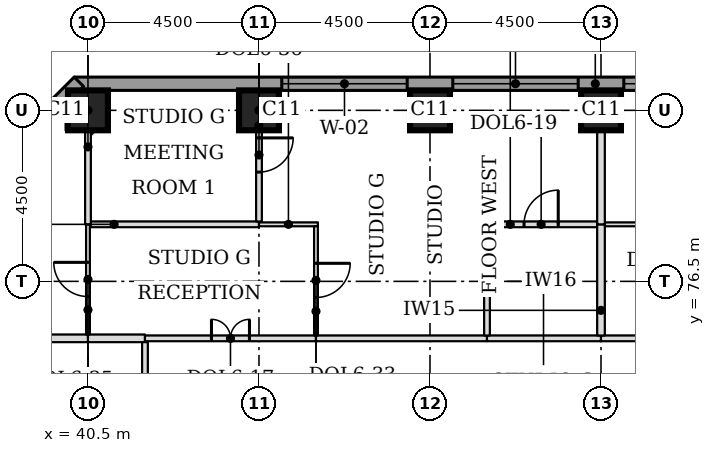
"""IFC4 building model, lengths in metres.
Left out: names, types, materials, properties, quantities, classifications, styles, units other than length and angle.
Written with IfcOpenShell. Run it as: python <this file> out.ifc"""

import sys

from ifc_helpers import new_model, si_unit, direction, frame, frame_2d, origin, origin_2d, place, context, subcontext, project, spatial, rectangle, extrude, element, fill, save


model = new_model("IFC4")
c1 = context("Model", 3, precision=1e-05, world=origin(), true_north=direction((0.0, 1.0)))
c2 = subcontext(c1, "Body", "Model", "MODEL_VIEW")
j1 = project(units=[si_unit("LENGTHUNIT", "METRE"), si_unit("PLANEANGLEUNIT", "RADIAN")], contexts=[c1])
p1 = place(None, origin())
s1 = spatial("IfcSite", under=j1, at=p1, CompositionType="ELEMENT")
p2 = place(p1, origin())
s2 = spatial("IfcBuilding", under=s1, at=p2, CompositionType="ELEMENT")
p3 = place(p2, frame((0.0, 0.0, 119.6)))
s3 = spatial("IfcBuildingStorey", under=s2, at=p3, CompositionType="ELEMENT", Elevation=119.6)
for number, where, z_axis, x_axis in (
    (1, (40.5, 81.0, 0.0), (0.0, 0.0, 1.0), (1.0, 0.0, 0.0)),
    (2, (45.0, 81.0, 0.0), (0.0, 0.0, 1.0), (1.0, 0.0, 0.0)),
    (3, (49.5, 81.0, 0.0), (0.0, 0.0, 1.0), (1.0, 0.0, 0.0)),
    (4, (54.0, 81.0, 0.0), (0.0, 0.0, 1.0), (1.0, 0.0, 0.0)),
):
    element("IfcColumn", number, at=place(p3, frame(where, z_axis=z_axis, x_axis=x_axis)), inside=s3, PredefinedType="COLUMN", context=c2, shape_type="SweptSolid", body=[
        extrude(rectangle(XDim=1.05, YDim=1.05, at=origin_2d()), origin(), (0.0, 0.0, 1.0), 3.7),
    ])
p4 = place(p3, frame((72.362, 81.7, 0.0), z_axis=(0.0, 0.0, 1.0), x_axis=(-1.0, 0.0, 0.0)))
e5 = element("IfcWall", 5, at=p4, inside=s3, PredefinedType="STANDARD", context=c2, shape_type="SweptSolid", body=[
    extrude(rectangle(XDim=32.225, YDim=0.35, at=frame_2d((16.112, 0.0))), origin(), (0.0, 0.0, 1.0), 3.525),
])
p5 = place(p4, frame((5.462, 0.0, 0.9)))
e6 = element("IfcOpeningElement", 6, at=p5, cuts=e5, PredefinedType="OPENING", context=c2, shape_type="SweptSolid", body=[
    extrude(rectangle(XDim=3.3, YDim=1.9, at=frame_2d((1.65, 0.95))), frame((0.0, 0.185, 0.0), z_axis=(0.0, -1.0, 0.0), x_axis=(1.0, 0.0, 0.0)), (0.0, 0.0, 1.0), 0.37),
])
p6 = place(p4, frame((9.962, 0.0, 0.9)))
e7 = element("IfcOpeningElement", 7, at=p6, cuts=e5, PredefinedType="OPENING", context=c2, shape_type="SweptSolid", body=[
    extrude(rectangle(XDim=3.3, YDim=1.9, at=frame_2d((1.65, 0.95))), frame((0.0, 0.185, 0.0), z_axis=(0.0, -1.0, 0.0), x_axis=(1.0, 0.0, 0.0)), (0.0, 0.0, 1.0), 0.37),
])
p7 = place(p4, frame((14.462, 0.0, 0.9)))
e8 = element("IfcOpeningElement", 8, at=p7, cuts=e5, PredefinedType="OPENING", context=c2, shape_type="SweptSolid", body=[
    extrude(rectangle(XDim=3.3, YDim=1.9, at=frame_2d((1.65, 0.95))), frame((0.0, 0.185, 0.0), z_axis=(0.0, -1.0, 0.0), x_axis=(1.0, 0.0, 0.0)), (0.0, 0.0, 1.0), 0.37),
])
p8 = place(p4, frame((18.962, 0.0, 0.9)))
e9 = element("IfcOpeningElement", 9, at=p8, cuts=e5, PredefinedType="OPENING", context=c2, shape_type="SweptSolid", body=[
    extrude(rectangle(XDim=3.3, YDim=1.9, at=frame_2d((1.65, 0.95))), frame((0.0, 0.185, 0.0), z_axis=(0.0, -1.0, 0.0), x_axis=(1.0, 0.0, 0.0)), (0.0, 0.0, 1.0), 0.37),
])
p9 = place(p4, frame((23.462, 0.0, 0.9)))
e10 = element("IfcOpeningElement", 10, at=p9, cuts=e5, PredefinedType="OPENING", context=c2, shape_type="SweptSolid", body=[
    extrude(rectangle(XDim=3.3, YDim=1.9, at=frame_2d((1.65, 0.95))), frame((0.0, 0.185, 0.0), z_axis=(0.0, -1.0, 0.0), x_axis=(1.0, 0.0, 0.0)), (0.0, 0.0, 1.0), 0.37),
])
p10 = place(p3, frame((40.261, 81.751, 0.0), z_axis=(0.0, 0.0, 1.0), x_axis=(-0.707106781187, -0.707106781187, 0.0)))
e11 = element("IfcWall", 11, at=p10, inside=s3, PredefinedType="STANDARD", context=c2, shape_type="SweptSolid", body=[
    extrude(rectangle(XDim=7.089, YDim=0.35, at=frame_2d((3.544, 0.0))), origin(), (0.0, 0.0, 1.0), 3.525),
])
p11 = place(p10, frame((1.894, 0.0, 0.9)))
e12 = element("IfcOpeningElement", 12, at=p11, cuts=e11, PredefinedType="OPENING", context=c2, shape_type="SweptSolid", body=[
    extrude(rectangle(XDim=3.3, YDim=1.9, at=frame_2d((1.65, 0.95))), frame((0.0, 0.185, 0.0), z_axis=(0.0, -1.0, 0.0), x_axis=(1.0, 0.0, 0.0)), (0.0, 0.0, 1.0), 0.37),
])
p12 = place(p3, frame((35.475, 75.0, 0.0), z_axis=(0.0, 0.0, 1.0), x_axis=(1.0, 0.0, 0.0)))
e13 = element("IfcWall", 13, at=p12, inside=s3, PredefinedType="PARTITIONING", context=c2, shape_type="SweptSolid", body=[
    extrude(rectangle(XDim=5.025, YDim=0.2, at=frame_2d((2.512, 0.0))), origin(), (0.0, 0.0, 1.0), 3.55),
])
p13 = place(p3, frame((40.5, 75.0, 0.0), z_axis=(0.0, 0.0, 1.0), x_axis=(1.0, 0.0, 0.0)))
e14 = element("IfcWall", 14, at=p13, inside=s3, PredefinedType="PARTITIONING", context=c2, shape_type="SweptSolid", body=[
    extrude(rectangle(XDim=1.5, YDim=0.2, at=frame_2d((0.75, 0.0))), origin(), (0.0, 0.0, 1.0), 3.55),
])
p14 = place(p3, frame((42.0, 75.0, 0.0), z_axis=(0.0, 0.0, 1.0), x_axis=(1.0, 0.0, 0.0)))
e15 = element("IfcWall", 15, at=p14, inside=s3, PredefinedType="PARTITIONING", context=c2, shape_type="SweptSolid", body=[
    extrude(rectangle(XDim=4.5, YDim=0.15, at=frame_2d((2.25, 0.0))), origin(), (0.0, 0.0, 1.0), 3.55),
])
p15 = place(p14, frame((1.75, 0.0, 0.0)))
e16 = element("IfcOpeningElement", 16, at=p15, cuts=e15, PredefinedType="OPENING", context=c2, shape_type="SweptSolid", body=[
    extrude(rectangle(XDim=1.0, YDim=2.1, at=frame_2d((0.5, 1.05))), frame((0.0, 0.085, 0.0), z_axis=(0.0, -1.0, 0.0), x_axis=(1.0, 0.0, 0.0)), (0.0, 0.0, 1.0), 0.17),
])
p16 = place(p3, frame((46.5, 75.0, 0.0), z_axis=(0.0, 0.0, 1.0), x_axis=(1.0, 0.0, 0.0)))
e17 = element("IfcWall", 17, at=p16, inside=s3, PredefinedType="PARTITIONING", context=c2, shape_type="SweptSolid", body=[
    extrude(rectangle(XDim=4.5, YDim=0.15, at=frame_2d((2.25, 0.0))), origin(), (0.0, 0.0, 1.0), 3.55),
])
p17 = place(p3, frame((51.0, 75.0, 0.0), z_axis=(0.0, 0.0, 1.0), x_axis=(1.0, 0.0, 0.0)))
e18 = element("IfcWall", 18, at=p17, inside=s3, PredefinedType="PARTITIONING", context=c2, shape_type="SweptSolid", body=[
    extrude(rectangle(XDim=3.0, YDim=0.15, at=frame_2d((1.5, 0.0))), origin(), (0.0, 0.0, 1.0), 3.55),
])
p18 = place(p3, frame((54.0, 75.0, 0.0), z_axis=(0.0, 0.0, 1.0), x_axis=(1.0, 0.0, 0.0)))
e19 = element("IfcWall", 19, at=p18, inside=s3, PredefinedType="PARTITIONING", context=c2, shape_type="SweptSolid", body=[
    extrude(rectangle(XDim=4.5, YDim=0.15, at=frame_2d((2.25, 0.0))), origin(), (0.0, 0.0, 1.0), 3.55),
])
p19 = place(p18, frame((1.75, 0.0, 0.0)))
e20 = element("IfcOpeningElement", 20, at=p19, cuts=e19, PredefinedType="OPENING", context=c2, shape_type="SweptSolid", body=[
    extrude(rectangle(XDim=1.0, YDim=2.1, at=frame_2d((0.5, 1.05))), frame((0.0, 0.085, 0.0), z_axis=(0.0, -1.0, 0.0), x_axis=(1.0, 0.0, 0.0)), (0.0, 0.0, 1.0), 0.17),
])
p20 = place(p3, frame((40.575, 78.0, 0.0), z_axis=(0.0, 0.0, 1.0), x_axis=(1.0, 0.0, 0.0)))
e21 = element("IfcWall", 21, at=p20, inside=s3, PredefinedType="PARTITIONING", context=c2, shape_type="SweptSolid", body=[
    extrude(rectangle(XDim=4.425, YDim=0.15, at=frame_2d((2.212, 0.0))), origin(), (0.0, 0.0, 1.0), 3.55),
])
p21 = place(p3, frame((45.0, 78.0, 0.0), z_axis=(0.0, 0.0, 1.0), x_axis=(1.0, 0.0, 0.0)))
e22 = element("IfcWall", 22, at=p21, inside=s3, PredefinedType="PARTITIONING", context=c2, shape_type="SweptSolid", body=[
    extrude(rectangle(XDim=1.55, YDim=0.1, at=frame_2d((0.775, 0.0))), origin(), (0.0, 0.0, 1.0), 3.55),
])
p22 = place(p3, frame((50.925, 78.0, 0.0), z_axis=(0.0, 0.0, 1.0), x_axis=(1.0, 0.0, 0.0)))
e23 = element("IfcWall", 23, at=p22, inside=s3, PredefinedType="PARTITIONING", context=c2, shape_type="SweptSolid", body=[
    extrude(rectangle(XDim=2.975, YDim=0.15, at=frame_2d((1.487, 0.0))), origin(), (0.0, 0.0, 1.0), 3.55),
])
p23 = place(p22, frame((1.05, 0.0, 0.0)))
e24 = element("IfcOpeningElement", 24, at=p23, cuts=e23, PredefinedType="OPENING", context=c2, shape_type="SweptSolid", body=[
    extrude(rectangle(XDim=0.9, YDim=2.1, at=frame_2d((0.45, 1.05))), frame((0.0, 0.085, 0.0), z_axis=(0.0, -1.0, 0.0), x_axis=(1.0, 0.0, 0.0)), (0.0, 0.0, 1.0), 0.17),
])
p24 = place(p3, frame((54.1, 78.0, 0.0), z_axis=(0.0, 0.0, 1.0), x_axis=(1.0, 0.0, 0.0)))
e25 = element("IfcWall", 25, at=p24, inside=s3, PredefinedType="PARTITIONING", context=c2, shape_type="SweptSolid", body=[
    extrude(rectangle(XDim=4.35, YDim=0.1, at=frame_2d((2.175, 0.0))), origin(), (0.0, 0.0, 1.0), 3.55),
])
p25 = place(p24, frame((1.75, 0.0, 0.0)))
e26 = element("IfcOpeningElement", 26, at=p25, cuts=e25, PredefinedType="OPENING", context=c2, shape_type="SweptSolid", body=[
    extrude(rectangle(XDim=0.9, YDim=2.1, at=frame_2d((0.45, 1.05))), frame((0.0, 0.06, 0.0), z_axis=(0.0, -1.0, 0.0), x_axis=(1.0, 0.0, 0.0)), (0.0, 0.0, 1.0), 0.12),
])
p26 = place(p3, frame((42.0, 57.075, 0.0), z_axis=(0.0, 0.0, 1.0), x_axis=(0.0, 1.0, 0.0)))
e27 = element("IfcWall", 27, at=p26, inside=s3, PredefinedType="PARTITIONING", context=c2, shape_type="SweptSolid", body=[
    extrude(rectangle(XDim=17.825, YDim=0.15, at=frame_2d((8.913, 0.0))), origin(), (0.0, 0.0, 1.0), 3.55),
])
p27 = place(p3, frame((46.5, 75.075, 0.0), z_axis=(0.0, 0.0, 1.0), x_axis=(0.0, 1.0, 0.0)))
e28 = element("IfcWall", 28, at=p27, inside=s3, PredefinedType="PARTITIONING", context=c2, shape_type="SweptSolid", body=[
    extrude(rectangle(XDim=2.875, YDim=0.1, at=frame_2d((1.438, 0.0))), origin(), (0.0, 0.0, 1.0), 3.022),
])
p28 = place(p27, frame((1.0, 0.0, 0.0)))
e29 = element("IfcOpeningElement", 29, at=p28, cuts=e28, PredefinedType="OPENING", context=c2, shape_type="SweptSolid", body=[
    extrude(rectangle(XDim=0.9, YDim=2.1, at=frame_2d((0.45, 1.05))), frame((0.0, 0.06, 0.0), z_axis=(0.0, -1.0, 0.0), x_axis=(1.0, 0.0, 0.0)), (0.0, 0.0, 1.0), 0.12),
])
p29 = place(p3, frame((51.0, 75.075, 0.0), z_axis=(0.0, 0.0, 1.0), x_axis=(0.0, 1.0, 0.0)))
e30 = element("IfcWall", 30, at=p29, inside=s3, PredefinedType="PARTITIONING", context=c2, shape_type="SweptSolid", body=[
    extrude(rectangle(XDim=2.85, YDim=0.15, at=frame_2d((1.425, 0.0))), origin(), (0.0, 0.0, 1.0), 3.55),
])
p30 = place(p3, frame((54.0, 75.075, 0.0), z_axis=(0.0, 0.0, 1.0), x_axis=(0.0, 1.0, 0.0)))
e31 = element("IfcWall", 31, at=p30, inside=s3, PredefinedType="PARTITIONING", context=c2, shape_type="SweptSolid", body=[
    extrude(rectangle(XDim=2.925, YDim=0.2, at=frame_2d((1.462, 0.0))), origin(), (0.0, 0.0, 1.0), 3.55),
])
p31 = place(p3, frame((40.5, 75.1, 0.0), z_axis=(0.0, 0.0, 1.0), x_axis=(0.0, 1.0, 0.0)))
e32 = element("IfcWall", 32, at=p31, inside=s3, PredefinedType="PARTITIONING", context=c2, shape_type="SweptSolid", body=[
    extrude(rectangle(XDim=2.9, YDim=0.1, at=frame_2d((1.45, 0.0))), origin(), (0.0, 0.0, 1.0), 3.55),
])
p32 = place(p31, frame((1.0, 0.0, 0.0)))
e33 = element("IfcOpeningElement", 33, at=p32, cuts=e32, PredefinedType="OPENING", context=c2, shape_type="SweptSolid", body=[
    extrude(rectangle(XDim=0.9, YDim=2.1, at=frame_2d((0.45, 1.05))), frame((0.0, 0.06, 0.0), z_axis=(0.0, -1.0, 0.0), x_axis=(1.0, 0.0, 0.0)), (0.0, 0.0, 1.0), 0.12),
])
p33 = place(p3, frame((40.5, 78.0, 0.0), z_axis=(0.0, 0.0, 1.0), x_axis=(0.0, 1.0, 0.0)))
e34 = element("IfcWall", 34, at=p33, inside=s3, PredefinedType="PARTITIONING", context=c2, shape_type="SweptSolid", body=[
    extrude(rectangle(XDim=2.475, YDim=0.15, at=frame_2d((1.238, 0.0))), origin(), (0.0, 0.0, 1.0), 3.55),
])
p34 = place(p3, frame((54.0, 78.0, 0.0), z_axis=(0.0, 0.0, 1.0), x_axis=(0.0, 1.0, 0.0)))
e35 = element("IfcWall", 35, at=p34, inside=s3, PredefinedType="PARTITIONING", context=c2, shape_type="SweptSolid", body=[
    extrude(rectangle(XDim=3.525, YDim=0.2, at=frame_2d((1.762, 0.0))), origin(), (0.0, 0.0, 1.0), 3.55),
])
p35 = place(p3, frame((45.0, 78.075, 0.0), z_axis=(0.0, 0.0, 1.0), x_axis=(0.0, 1.0, 0.0)))
e36 = element("IfcWall", 36, at=p35, inside=s3, PredefinedType="PARTITIONING", context=c2, shape_type="SweptSolid", body=[
    extrude(rectangle(XDim=3.45, YDim=0.15, at=frame_2d((1.725, 0.0))), origin(), (0.0, 0.0, 1.0), 3.55),
])
p36 = place(p35, frame((1.3, 0.0, 0.0)))
e37 = element("IfcOpeningElement", 37, at=p36, cuts=e36, PredefinedType="OPENING", context=c2, shape_type="SweptSolid", body=[
    extrude(rectangle(XDim=0.9, YDim=2.1, at=frame_2d((0.45, 1.05))), frame((0.0, 0.085, 0.0), z_axis=(0.0, -1.0, 0.0), x_axis=(1.0, 0.0, 0.0)), (0.0, 0.0, 1.0), 0.17),
])
p37 = place(p7, origin())
e38 = element("IfcWindow", 38, at=p37, inside=s3, PartitioningType="SINGLE_PANEL", PredefinedType="WINDOW", context=c2, shape_type="SweptSolid", body=[
    extrude(rectangle(XDim=3.3, YDim=1.9, at=frame_2d((1.65, 0.95))), frame((0.0, 0.085, 0.0), z_axis=(0.0, -1.0, 0.0), x_axis=(1.0, 0.0, 0.0)), (0.0, 0.0, 1.0), 0.06),
])
fill(e8, e38)
p38 = place(p8, origin())
e39 = element("IfcWindow", 39, at=p38, inside=s3, PartitioningType="SINGLE_PANEL", PredefinedType="WINDOW", context=c2, shape_type="SweptSolid", body=[
    extrude(rectangle(XDim=3.3, YDim=1.9, at=frame_2d((1.65, 0.95))), frame((0.0, 0.085, 0.0), z_axis=(0.0, -1.0, 0.0), x_axis=(1.0, 0.0, 0.0)), (0.0, 0.0, 1.0), 0.06),
])
fill(e9, e39)
p39 = place(p9, origin())
e40 = element("IfcWindow", 40, at=p39, inside=s3, PartitioningType="SINGLE_PANEL", PredefinedType="WINDOW", context=c2, shape_type="SweptSolid", body=[
    extrude(rectangle(XDim=3.3, YDim=1.9, at=frame_2d((1.65, 0.95))), frame((0.0, 0.085, 0.0), z_axis=(0.0, -1.0, 0.0), x_axis=(1.0, 0.0, 0.0)), (0.0, 0.0, 1.0), 0.06),
])
fill(e10, e40)
p40 = place(p15, origin())
e41 = element("IfcDoor", 41, at=p40, inside=s3, OperationType="DOUBLE_DOOR_SINGLE_SWING", PredefinedType="DOOR", context=c2, shape_type="SweptSolid", body=[
    extrude(rectangle(XDim=1.0, YDim=2.1, at=frame_2d((0.5, 1.05))), frame((0.0, 0.025, 0.0), z_axis=(0.0, -1.0, 0.0), x_axis=(1.0, 0.0, 0.0)), (0.0, 0.0, 1.0), 0.05),
])
fill(e16, e41)
p41 = place(p28, frame((0.9, 0.0, 0.0), z_axis=(0.0, 0.0, 1.0), x_axis=(-1.0, 0.0, 0.0)))
e42 = element("IfcDoor", 42, at=p41, inside=s3, OperationType="SINGLE_SWING_LEFT", PredefinedType="DOOR", context=c2, shape_type="SweptSolid", body=[
    extrude(rectangle(XDim=0.9, YDim=2.1, at=frame_2d((0.45, 1.05))), frame((0.0, 0.025, 0.0), z_axis=(0.0, -1.0, 0.0), x_axis=(1.0, 0.0, 0.0)), (0.0, 0.0, 1.0), 0.05),
])
fill(e29, e42)
p42 = place(p32, origin())
e43 = element("IfcDoor", 43, at=p42, inside=s3, OperationType="SINGLE_SWING_RIGHT", PredefinedType="DOOR", context=c2, shape_type="SweptSolid", body=[
    extrude(rectangle(XDim=0.9, YDim=2.1, at=frame_2d((0.45, 1.05))), frame((0.0, 0.025, 0.0), z_axis=(0.0, -1.0, 0.0), x_axis=(1.0, 0.0, 0.0)), (0.0, 0.0, 1.0), 0.05),
])
fill(e33, e43)
p43 = place(p23, origin())
e44 = element("IfcDoor", 44, at=p43, inside=s3, OperationType="SINGLE_SWING_RIGHT", PredefinedType="DOOR", context=c2, shape_type="SweptSolid", body=[
    extrude(rectangle(XDim=0.9, YDim=2.1, at=frame_2d((0.45, 1.05))), frame((0.0, 0.025, 0.0), z_axis=(0.0, -1.0, 0.0), x_axis=(1.0, 0.0, 0.0)), (0.0, 0.0, 1.0), 0.05),
])
fill(e24, e44)
p44 = place(p36, frame((0.9, 0.0, 0.0), z_axis=(0.0, 0.0, 1.0), x_axis=(-1.0, 0.0, 0.0)))
e45 = element("IfcDoor", 45, at=p44, inside=s3, OperationType="SINGLE_SWING_LEFT", PredefinedType="DOOR", context=c2, shape_type="SweptSolid", body=[
    extrude(rectangle(XDim=0.9, YDim=2.1, at=frame_2d((0.45, 1.05))), frame((0.0, 0.025, 0.0), z_axis=(0.0, -1.0, 0.0), x_axis=(1.0, 0.0, 0.0)), (0.0, 0.0, 1.0), 0.05),
])
fill(e37, e45)
save(model, sys.argv[1])
